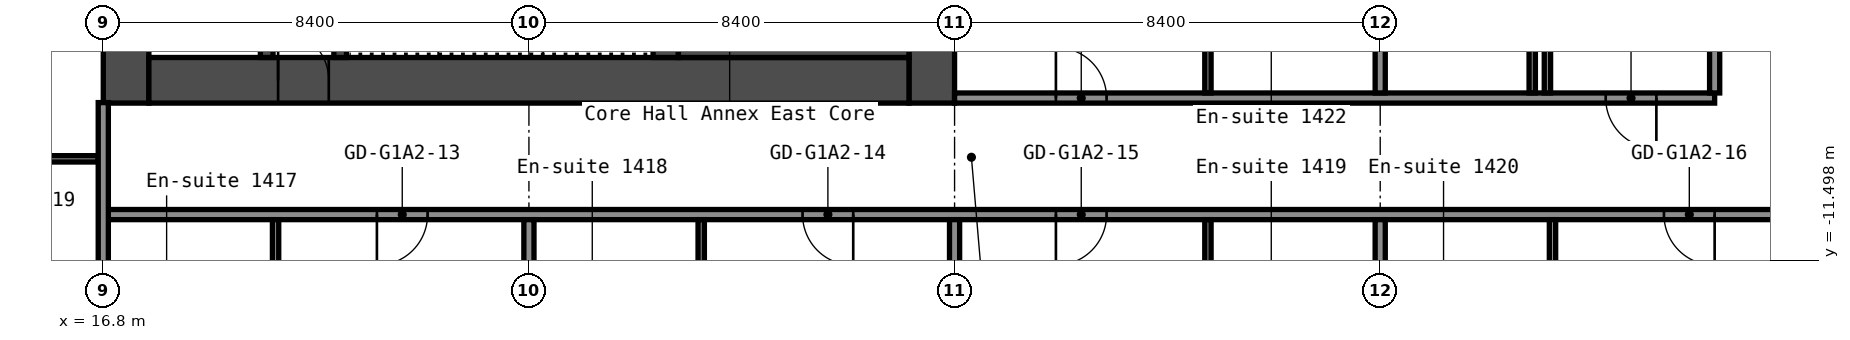
"""IFC4 building model, lengths in metres.
Left out: names, types, materials, properties, quantities, classifications, styles, units other than length and angle.
Written with IfcOpenShell. Run it as: python <this file> out.ifc"""

import sys

from ifc_helpers import new_model, si_unit, direction, frame, frame_2d, origin, place, context, subcontext, project, spatial, rectangle, extrude, element, fill, save


model = new_model("IFC4")
c1 = context("Model", 3, precision=1e-05, world=origin(), true_north=direction((0.0, 1.0)))
c2 = subcontext(c1, "Body", "Model", "MODEL_VIEW")
j1 = project(units=[si_unit("LENGTHUNIT", "METRE"), si_unit("PLANEANGLEUNIT", "RADIAN")], contexts=[c1])
p1 = place(None, origin())
s1 = spatial("IfcSite", under=j1, at=p1, CompositionType="ELEMENT")
p2 = place(p1, origin())
s2 = spatial("IfcBuilding", under=s1, at=p2, CompositionType="ELEMENT")
p3 = place(p2, frame((0.0, 0.0, 51.8)))
s3 = spatial("IfcBuildingStorey", under=s2, at=p3, CompositionType="ELEMENT", Elevation=51.8)
p4 = place(p3, frame((17.25, -8.4, 0.0), z_axis=(0.0, 0.0, 1.0), x_axis=(0.0, 1.0, 0.0)))
e1 = element("IfcWall", 1, at=p4, inside=s3, PredefinedType="SHEAR", context=c2, shape_type="SweptSolid", body=[
    extrude(rectangle(XDim=16.8, YDim=0.9, at=frame_2d((8.4, 0.0))), origin(), (0.0, 0.0, 1.0), 2.8),
])
p5 = place(p4, frame((12.75, 0.0, 0.0)))
e2 = element("IfcOpeningElement", 2, at=p5, cuts=e1, PredefinedType="OPENING", context=c2, shape_type="SweptSolid", body=[
    extrude(rectangle(XDim=1.2, YDim=2.1, at=frame_2d((0.6, 1.05))), frame((0.0, 0.46, 0.0), z_axis=(0.0, -1.0, 0.0), x_axis=(1.0, 0.0, 0.0)), (0.0, 0.0, 1.0), 0.92),
])
p6 = place(p4, frame((2.85, 0.0, 0.0)))
e3 = element("IfcOpeningElement", 3, at=p6, cuts=e1, PredefinedType="OPENING", context=c2, shape_type="SweptSolid", body=[
    extrude(rectangle(XDim=1.2, YDim=2.1, at=frame_2d((0.6, 1.05))), frame((0.0, 0.46, 0.0), z_axis=(0.0, -1.0, 0.0), x_axis=(1.0, 0.0, 0.0)), (0.0, 0.0, 1.0), 0.92),
])
p7 = place(p3, frame((33.15, -8.4, 0.0), z_axis=(0.0, 0.0, 1.0), x_axis=(0.0, 1.0, 0.0)))
e4 = element("IfcWall", 4, at=p7, inside=s3, PredefinedType="SHEAR", context=c2, shape_type="SweptSolid", body=[
    extrude(rectangle(XDim=16.8, YDim=0.9, at=frame_2d((8.4, 0.0))), origin(), (0.0, 0.0, 1.0), 2.8),
])
p8 = place(p3, frame((17.7, -7.95, 0.0), z_axis=(0.0, 0.0, 1.0), x_axis=(1.0, 0.0, 0.0)))
e5 = element("IfcWall", 5, at=p8, inside=s3, PredefinedType="SHEAR", context=c2, shape_type="SweptSolid", body=[
    extrude(rectangle(XDim=15.0, YDim=0.9, at=frame_2d((7.5, 0.0))), origin(), (0.0, 0.0, 1.0), 2.8),
])
p9 = place(p8, frame((2.55, 0.0, 0.0)))
e6 = element("IfcOpeningElement", 6, at=p9, cuts=e5, PredefinedType="OPENING", context=c2, shape_type="SweptSolid", body=[
    extrude(rectangle(XDim=1.0, YDim=2.1, at=frame_2d((0.5, 1.05))), frame((0.0, 0.46, 0.0), z_axis=(0.0, -1.0, 0.0), x_axis=(1.0, 0.0, 0.0)), (0.0, 0.0, 1.0), 0.92),
])
p10 = place(p3, frame((20.025, -7.5, 0.0), z_axis=(0.0, 0.0, 1.0), x_axis=(0.0, 1.0, 0.0)))
e7 = element("IfcWall", 7, at=p10, inside=s3, PredefinedType="SHEAR", context=c2, shape_type="SweptSolid", body=[
    extrude(rectangle(XDim=6.3, YDim=0.25, at=frame_2d((3.15, 0.0))), origin(), (0.0, 0.0, 1.0), 2.8),
])
p11 = place(p10, frame((2.4, 0.0, 0.0)))
e8 = element("IfcOpeningElement", 8, at=p11, cuts=e7, PredefinedType="OPENING", context=c2, shape_type="SweptSolid", body=[
    extrude(rectangle(XDim=1.0, YDim=2.1, at=frame_2d((0.5, 1.05))), frame((0.0, 0.135, 0.0), z_axis=(0.0, -1.0, 0.0), x_axis=(1.0, 0.0, 0.0)), (0.0, 0.0, 1.0), 0.27),
])
p12 = place(p3, frame((21.475, -7.5, 0.0), z_axis=(0.0, 0.0, 1.0), x_axis=(0.0, 1.0, 0.0)))
e9 = element("IfcWall", 9, at=p12, inside=s3, PredefinedType="SHEAR", context=c2, shape_type="SweptSolid", body=[
    extrude(rectangle(XDim=3.75, YDim=0.25, at=frame_2d((1.875, 0.0))), origin(), (0.0, 0.0, 1.0), 2.8),
])
p13 = place(p12, frame((1.3, 0.0, 0.0)))
e10 = element("IfcOpeningElement", 10, at=p13, cuts=e9, PredefinedType="OPENING", context=c2, shape_type="SweptSolid", body=[
    extrude(rectangle(XDim=1.2, YDim=2.1, at=frame_2d((0.6, 1.05))), frame((0.0, 0.135, 0.0), z_axis=(0.0, -1.0, 0.0), x_axis=(1.0, 0.0, 0.0)), (0.0, 0.0, 1.0), 0.27),
])
p14 = place(p3, frame((27.9, -7.5, 0.0), z_axis=(0.0, 0.0, 1.0), x_axis=(0.0, 1.0, 0.0)))
e11 = element("IfcWall", 11, at=p14, inside=s3, PredefinedType="SHEAR", context=c2, shape_type="SweptSolid", body=[
    extrude(rectangle(XDim=3.75, YDim=0.5, at=frame_2d((1.875, 0.0))), origin(), (0.0, 0.0, 1.0), 2.8),
])
p15 = place(p3, frame((28.15, -6.75, 0.0), z_axis=(0.0, 0.0, 1.0), x_axis=(1.0, 0.0, 0.0)))
e12 = element("IfcWall", 12, at=p15, inside=s3, PredefinedType="SHEAR", context=c2, shape_type="SweptSolid", body=[
    extrude(rectangle(XDim=4.55, YDim=1.5, at=frame_2d((2.275, 0.0))), origin(), (0.0, 0.0, 1.0), 2.8),
])
p16 = place(p3, frame((16.8, -10.6, 0.0), z_axis=(0.0, 0.0, 1.0), x_axis=(1.0, 0.0, 0.0)))
e13 = element("IfcWall", 13, at=p16, inside=s3, PredefinedType="PARTITIONING", context=c2, shape_type="SweptSolid", body=[
    extrude(rectangle(XDim=34.3, YDim=0.2, at=frame_2d((17.15, 0.0))), origin(), (0.0, 0.0, 1.0), 2.8),
])
p17 = place(p16, frame((5.4, 0.0, 0.0)))
e14 = element("IfcOpeningElement", 14, at=p17, cuts=e13, PredefinedType="OPENING", context=c2, shape_type="SweptSolid", body=[
    extrude(rectangle(XDim=1.0, YDim=2.1, at=frame_2d((0.5, 1.05))), frame((0.0, 0.11, 0.0), z_axis=(0.0, -1.0, 0.0), x_axis=(1.0, 0.0, 0.0)), (0.0, 0.0, 1.0), 0.22),
])
p18 = place(p16, frame((13.8, 0.0, 0.0)))
e15 = element("IfcOpeningElement", 15, at=p18, cuts=e13, PredefinedType="OPENING", context=c2, shape_type="SweptSolid", body=[
    extrude(rectangle(XDim=1.0, YDim=2.1, at=frame_2d((0.5, 1.05))), frame((0.0, 0.11, 0.0), z_axis=(0.0, -1.0, 0.0), x_axis=(1.0, 0.0, 0.0)), (0.0, 0.0, 1.0), 0.22),
])
p19 = place(p16, frame((18.8, 0.0, 0.0)))
e16 = element("IfcOpeningElement", 16, at=p19, cuts=e13, PredefinedType="OPENING", context=c2, shape_type="SweptSolid", body=[
    extrude(rectangle(XDim=1.0, YDim=2.1, at=frame_2d((0.5, 1.05))), frame((0.0, 0.11, 0.0), z_axis=(0.0, -1.0, 0.0), x_axis=(1.0, 0.0, 0.0)), (0.0, 0.0, 1.0), 0.22),
])
p20 = place(p16, frame((30.8, 0.0, 0.0)))
e17 = element("IfcOpeningElement", 17, at=p20, cuts=e13, PredefinedType="OPENING", context=c2, shape_type="SweptSolid", body=[
    extrude(rectangle(XDim=1.0, YDim=2.1, at=frame_2d((0.5, 1.05))), frame((0.0, 0.11, 0.0), z_axis=(0.0, -1.0, 0.0), x_axis=(1.0, 0.0, 0.0)), (0.0, 0.0, 1.0), 0.22),
])
p21 = place(p3, frame((13.462, -9.5, 0.0), z_axis=(0.0, 0.0, 1.0), x_axis=(1.0, 0.0, 0.0)))
e18 = element("IfcWall", 18, at=p21, inside=s3, PredefinedType="PARTITIONING", context=c2, shape_type="SweptSolid", body=[
    extrude(rectangle(XDim=3.238, YDim=0.125, at=frame_2d((1.619, 0.0))), origin(), (0.0, 0.0, 1.0), 2.8),
])
p22 = place(p21, frame((1.238, 0.0, 0.0)))
e19 = element("IfcOpeningElement", 19, at=p22, cuts=e18, PredefinedType="OPENING", context=c2, shape_type="SweptSolid", body=[
    extrude(rectangle(XDim=0.8, YDim=2.1, at=frame_2d((0.4, 1.05))), frame((0.0, 0.073, 0.0), z_axis=(0.0, -1.0, 0.0), x_axis=(1.0, 0.0, 0.0)), (0.0, 0.0, 1.0), 0.145),
])
p23 = place(p3, frame((33.6, -8.3, 0.0), z_axis=(0.0, 0.0, 1.0), x_axis=(1.0, 0.0, 0.0)))
e20 = element("IfcWall", 20, at=p23, inside=s3, PredefinedType="PARTITIONING", context=c2, shape_type="SweptSolid", body=[
    extrude(rectangle(XDim=15.0, YDim=0.2, at=frame_2d((7.5, 0.0))), origin(), (0.0, 0.0, 1.0), 2.8),
])
p24 = place(p23, frame((2.0, 0.0, 0.0)))
e21 = element("IfcOpeningElement", 21, at=p24, cuts=e20, PredefinedType="OPENING", context=c2, shape_type="SweptSolid", body=[
    extrude(rectangle(XDim=1.0, YDim=2.1, at=frame_2d((0.5, 1.05))), frame((0.0, 0.11, 0.0), z_axis=(0.0, -1.0, 0.0), x_axis=(1.0, 0.0, 0.0)), (0.0, 0.0, 1.0), 0.22),
])
p25 = place(p23, frame((12.85, 0.0, 0.0)))
e22 = element("IfcOpeningElement", 22, at=p25, cuts=e20, PredefinedType="OPENING", context=c2, shape_type="SweptSolid", body=[
    extrude(rectangle(XDim=1.0, YDim=2.1, at=frame_2d((0.5, 1.05))), frame((0.0, 0.11, 0.0), z_axis=(0.0, -1.0, 0.0), x_axis=(1.0, 0.0, 0.0)), (0.0, 0.0, 1.0), 0.22),
])
p26 = place(p3, frame((16.8, -20.3, 0.0), z_axis=(0.0, 0.0, 1.0), x_axis=(0.0, 1.0, 0.0)))
e23 = element("IfcWall", 23, at=p26, inside=s3, PredefinedType="PARTITIONING", context=c2, shape_type="SweptSolid", body=[
    extrude(rectangle(XDim=11.91, YDim=0.2, at=frame_2d((5.955, 0.0))), origin(), (0.0, 0.0, 1.0), 2.8),
])
p27 = place(p3, frame((20.2, -14.0, 0.0), z_axis=(0.0, 0.0, 1.0), x_axis=(0.0, 1.0, 0.0)))
e24 = element("IfcWall", 24, at=p27, inside=s3, PredefinedType="PARTITIONING", context=c2, shape_type="SweptSolid", body=[
    extrude(rectangle(XDim=3.3, YDim=0.125, at=frame_2d((1.65, 0.0))), origin(), (0.0, 0.0, 1.0), 2.8),
])
p28 = place(p3, frame((25.2, -20.3, 0.0), z_axis=(0.0, 0.0, 1.0), x_axis=(0.0, 1.0, 0.0)))
e25 = element("IfcWall", 25, at=p28, inside=s3, PredefinedType="PARTITIONING", context=c2, shape_type="SweptSolid", body=[
    extrude(rectangle(XDim=9.6, YDim=0.2, at=frame_2d((4.8, 0.0))), origin(), (0.0, 0.0, 1.0), 2.8),
])
p29 = place(p3, frame((28.6, -14.0, 0.0), z_axis=(0.0, 0.0, 1.0), x_axis=(0.0, 1.0, 0.0)))
e26 = element("IfcWall", 26, at=p29, inside=s3, PredefinedType="PARTITIONING", context=c2, shape_type="SweptSolid", body=[
    extrude(rectangle(XDim=3.3, YDim=0.125, at=frame_2d((1.65, 0.0))), origin(), (0.0, 0.0, 1.0), 2.8),
])
p30 = place(p3, frame((33.6, -20.3, 0.0), z_axis=(0.0, 0.0, 1.0), x_axis=(0.0, 1.0, 0.0)))
e27 = element("IfcWall", 27, at=p30, inside=s3, PredefinedType="PARTITIONING", context=c2, shape_type="SweptSolid", body=[
    extrude(rectangle(XDim=9.6, YDim=0.2, at=frame_2d((4.8, 0.0))), origin(), (0.0, 0.0, 1.0), 2.8),
])
for number, where, z_axis, x_axis in (
    (28, (38.6, -14.0, 0.0), (0.0, 0.0, 1.0), (0.0, 1.0, 0.0)),
    (29, (38.6, -8.2, 0.0), (0.0, 0.0, 1.0), (0.0, 1.0, 0.0)),
):
    element("IfcWall", number, at=place(p3, frame(where, z_axis=z_axis, x_axis=x_axis)), inside=s3, PredefinedType="PARTITIONING", context=c2, shape_type="SweptSolid", body=[
        extrude(rectangle(XDim=3.3, YDim=0.125, at=frame_2d((1.65, 0.0))), origin(), (0.0, 0.0, 1.0), 2.8),
    ])
p31 = place(p3, frame((42.0, -20.3, 0.0), z_axis=(0.0, 0.0, 1.0), x_axis=(0.0, 1.0, 0.0)))
e30 = element("IfcWall", 30, at=p31, inside=s3, PredefinedType="PARTITIONING", context=c2, shape_type="SweptSolid", body=[
    extrude(rectangle(XDim=9.6, YDim=0.2, at=frame_2d((4.8, 0.0))), origin(), (0.0, 0.0, 1.0), 2.8),
])
p32 = place(p3, frame((42.0, -8.2, 0.0), z_axis=(0.0, 0.0, 1.0), x_axis=(0.0, 1.0, 0.0)))
e31 = element("IfcWall", 31, at=p32, inside=s3, PredefinedType="PARTITIONING", context=c2, shape_type="SweptSolid", body=[
    extrude(rectangle(XDim=8.2, YDim=0.2, at=frame_2d((4.1, 0.0))), origin(), (0.0, 0.0, 1.0), 2.8),
])
p33 = place(p3, frame((45.0, -8.2, 0.0), z_axis=(0.0, 0.0, 1.0), x_axis=(0.0, 1.0, 0.0)))
e32 = element("IfcWall", 32, at=p33, inside=s3, PredefinedType="PARTITIONING", context=c2, shape_type="SweptSolid", body=[
    extrude(rectangle(XDim=3.1, YDim=0.125, at=frame_2d((1.55, 0.0))), origin(), (0.0, 0.0, 1.0), 2.8),
])
p34 = place(p3, frame((45.3, -8.2, 0.0), z_axis=(0.0, 0.0, 1.0), x_axis=(0.0, 1.0, 0.0)))
e33 = element("IfcWall", 33, at=p34, inside=s3, PredefinedType="PARTITIONING", context=c2, shape_type="SweptSolid", body=[
    extrude(rectangle(XDim=8.1, YDim=0.125, at=frame_2d((4.05, 0.0))), origin(), (0.0, 0.0, 1.0), 2.8),
])
p35 = place(p34, frame((4.05, 0.0, 0.0)))
e34 = element("IfcOpeningElement", 34, at=p35, cuts=e33, PredefinedType="OPENING", context=c2, shape_type="SweptSolid", body=[
    extrude(rectangle(XDim=0.9, YDim=2.1, at=frame_2d((0.45, 1.05))), frame((0.0, 0.073, 0.0), z_axis=(0.0, -1.0, 0.0), x_axis=(1.0, 0.0, 0.0)), (0.0, 0.0, 1.0), 0.145),
])
p36 = place(p3, frame((45.4, -14.0, 0.0), z_axis=(0.0, 0.0, 1.0), x_axis=(0.0, 1.0, 0.0)))
e35 = element("IfcWall", 35, at=p36, inside=s3, PredefinedType="PARTITIONING", context=c2, shape_type="SweptSolid", body=[
    extrude(rectangle(XDim=3.3, YDim=0.125, at=frame_2d((1.65, 0.0))), origin(), (0.0, 0.0, 1.0), 2.8),
])
p37 = place(p3, frame((48.6, -8.2, 0.0), z_axis=(0.0, 0.0, 1.0), x_axis=(0.0, 1.0, 0.0)))
e36 = element("IfcWall", 36, at=p37, inside=s3, PredefinedType="PARTITIONING", context=c2, shape_type="SweptSolid", body=[
    extrude(rectangle(XDim=16.4, YDim=0.2, at=frame_2d((8.2, 0.0))), origin(), (0.0, 0.0, 1.0), 2.8),
])
p38 = place(p9, origin())
e37 = element("IfcDoor", 37, at=p38, inside=s3, OperationType="SINGLE_SWING_RIGHT", PredefinedType="DOOR", context=c2, shape_type="SweptSolid", body=[
    extrude(rectangle(XDim=1.0, YDim=2.1, at=frame_2d((0.5, 1.05))), frame((0.0, 0.025, 0.0), z_axis=(0.0, -1.0, 0.0), x_axis=(1.0, 0.0, 0.0)), (0.0, 0.0, 1.0), 0.05),
])
fill(e6, e37)
p39 = place(p17, origin())
e38 = element("IfcDoor", 38, at=p39, inside=s3, OperationType="SINGLE_SWING_LEFT", PredefinedType="DOOR", context=c2, shape_type="SweptSolid", body=[
    extrude(rectangle(XDim=1.0, YDim=2.1, at=frame_2d((0.5, 1.05))), frame((0.0, 0.025, 0.0), z_axis=(0.0, -1.0, 0.0), x_axis=(1.0, 0.0, 0.0)), (0.0, 0.0, 1.0), 0.05),
])
fill(e14, e38)
p40 = place(p18, origin())
e39 = element("IfcDoor", 39, at=p40, inside=s3, OperationType="SINGLE_SWING_RIGHT", PredefinedType="DOOR", context=c2, shape_type="SweptSolid", body=[
    extrude(rectangle(XDim=1.0, YDim=2.1, at=frame_2d((0.5, 1.05))), frame((0.0, 0.025, 0.0), z_axis=(0.0, -1.0, 0.0), x_axis=(1.0, 0.0, 0.0)), (0.0, 0.0, 1.0), 0.05),
])
fill(e15, e39)
p41 = place(p19, origin())
e40 = element("IfcDoor", 40, at=p41, inside=s3, OperationType="SINGLE_SWING_LEFT", PredefinedType="DOOR", context=c2, shape_type="SweptSolid", body=[
    extrude(rectangle(XDim=1.0, YDim=2.1, at=frame_2d((0.5, 1.05))), frame((0.0, 0.025, 0.0), z_axis=(0.0, -1.0, 0.0), x_axis=(1.0, 0.0, 0.0)), (0.0, 0.0, 1.0), 0.05),
])
fill(e16, e40)
p42 = place(p20, origin())
e41 = element("IfcDoor", 41, at=p42, inside=s3, OperationType="SINGLE_SWING_RIGHT", PredefinedType="DOOR", context=c2, shape_type="SweptSolid", body=[
    extrude(rectangle(XDim=1.0, YDim=2.1, at=frame_2d((0.5, 1.05))), frame((0.0, 0.025, 0.0), z_axis=(0.0, -1.0, 0.0), x_axis=(1.0, 0.0, 0.0)), (0.0, 0.0, 1.0), 0.05),
])
fill(e17, e41)
p43 = place(p24, origin())
e42 = element("IfcDoor", 42, at=p43, inside=s3, OperationType="SINGLE_SWING_RIGHT", PredefinedType="DOOR", context=c2, shape_type="SweptSolid", body=[
    extrude(rectangle(XDim=1.0, YDim=2.1, at=frame_2d((0.5, 1.05))), frame((0.0, 0.025, 0.0), z_axis=(0.0, -1.0, 0.0), x_axis=(1.0, 0.0, 0.0)), (0.0, 0.0, 1.0), 0.05),
])
fill(e21, e42)
p44 = place(p25, origin())
e43 = element("IfcDoor", 43, at=p44, inside=s3, OperationType="SINGLE_SWING_RIGHT", PredefinedType="DOOR", context=c2, shape_type="SweptSolid", body=[
    extrude(rectangle(XDim=1.0, YDim=2.1, at=frame_2d((0.5, 1.05))), frame((0.0, 0.025, 0.0), z_axis=(0.0, -1.0, 0.0), x_axis=(1.0, 0.0, 0.0)), (0.0, 0.0, 1.0), 0.05),
])
fill(e22, e43)
save(model, sys.argv[1])
